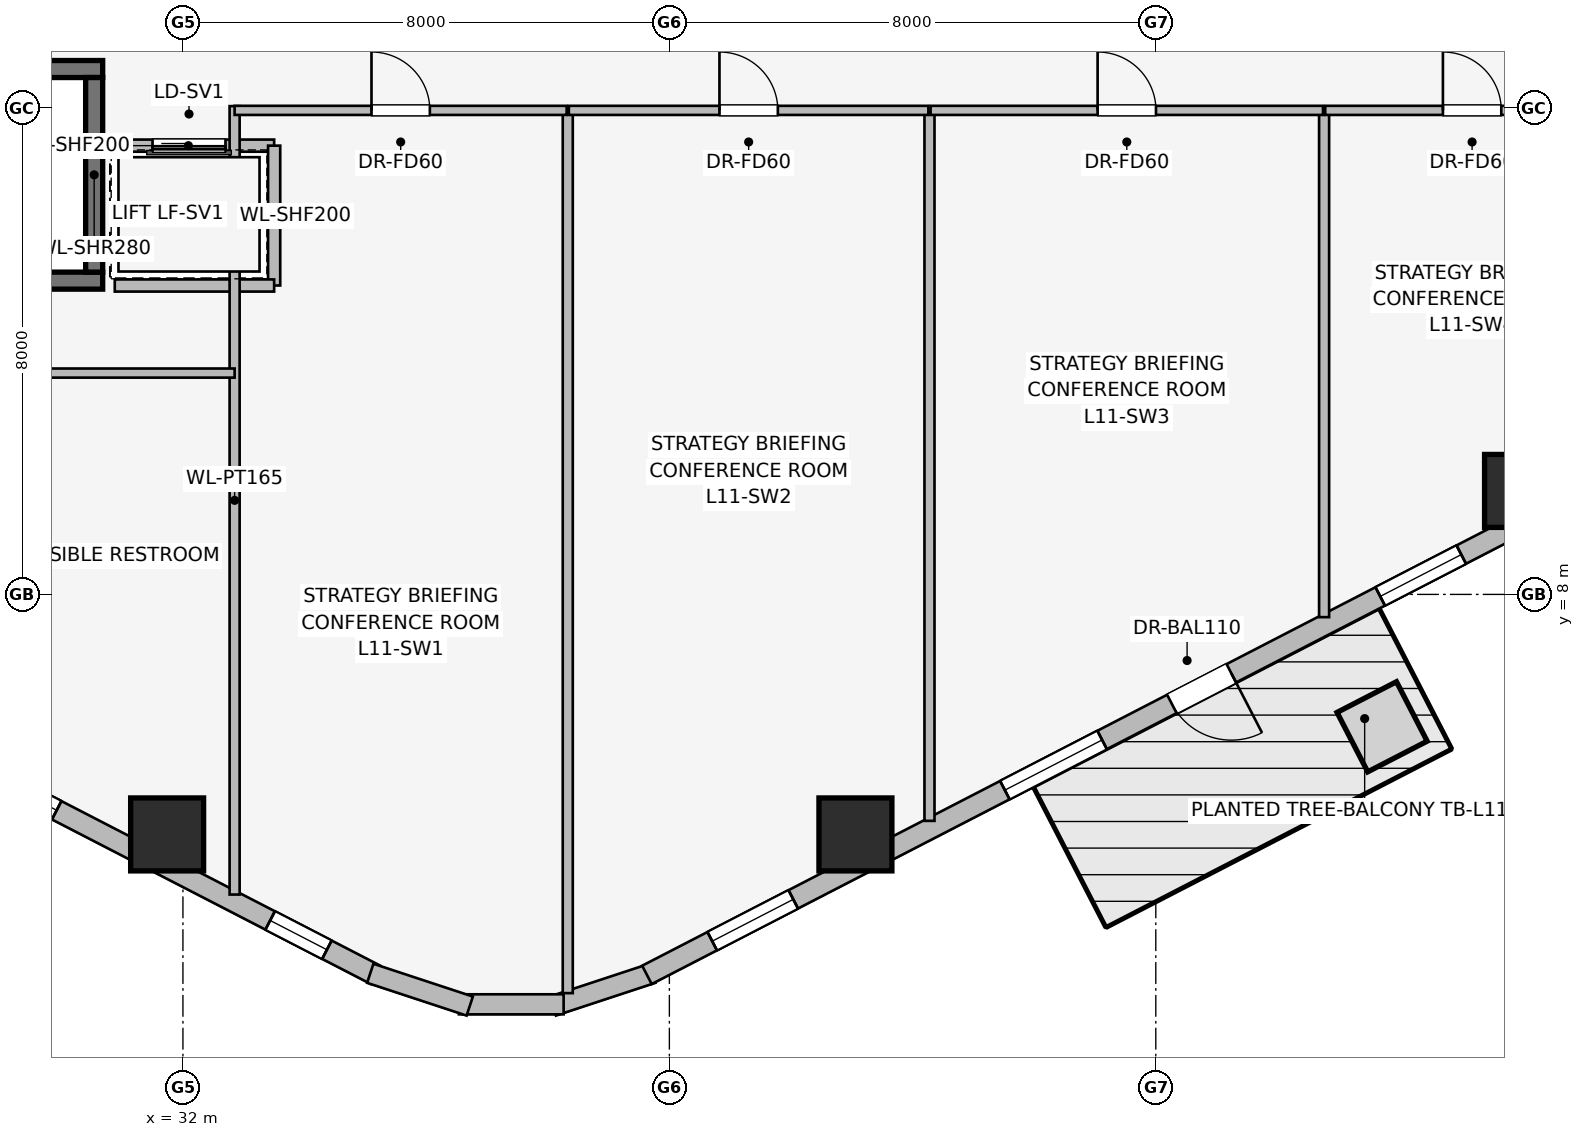
"""IFC4 building model, lengths in metres.
Left out: names, types, materials, properties, quantities, classifications, styles, units other than length and angle.
Written with IfcOpenShell. Run it as: python <this file> out.ifc"""

import sys

from ifc_helpers import new_model, si_unit, direction, frame, frame_2d, origin, origin_2d, place, context, subcontext, project, spatial, rectangle, extrude, element, fill, save


model = new_model("IFC4")
c1 = context("Model", 3, precision=1e-05, world=origin(), true_north=direction((0.0, 1.0)))
c2 = subcontext(c1, "Body", "Model", "MODEL_VIEW")
j1 = project(units=[si_unit("LENGTHUNIT", "METRE"), si_unit("PLANEANGLEUNIT", "RADIAN")], contexts=[c1])
p1 = place(None, origin())
s1 = spatial("IfcSite", under=j1, at=p1, CompositionType="ELEMENT")
p2 = place(p1, origin())
s2 = spatial("IfcBuilding", under=s1, at=p2, CompositionType="ELEMENT")
p3 = place(p2, frame((0.0, 0.0, 45.25)))
s3 = spatial("IfcBuildingStorey", under=s2, at=p3, CompositionType="ELEMENT", Elevation=45.25)
p4 = place(p3, frame((22.32, 13.16, 0.0), z_axis=(0.0, 0.0, 1.0), x_axis=(1.0, 0.0, 0.0)))
e1 = element("IfcWall", 1, at=p4, inside=s3, PredefinedType="SHEAR", context=c2, shape_type="SweptSolid", body=[
    extrude(rectangle(XDim=8.36, YDim=0.28, at=frame_2d((4.18, 0.0))), origin(), (0.0, 0.0, 1.0), 3.65),
])
p5 = place(p3, frame((30.68, 16.64, 0.0), z_axis=(0.0, 0.0, 1.0), x_axis=(-1.0, 0.0, 0.0)))
e2 = element("IfcWall", 2, at=p5, inside=s3, PredefinedType="SHEAR", context=c2, shape_type="SweptSolid", body=[
    extrude(rectangle(XDim=8.36, YDim=0.28, at=frame_2d((4.18, 0.0))), origin(), (0.0, 0.0, 1.0), 3.65),
])
p6 = place(p5, frame((6.08, 0.0, 0.0)))
e3 = element("IfcOpeningElement", 3, at=p6, cuts=e2, PredefinedType="OPENING", context=c2, shape_type="SweptSolid", body=[
    extrude(rectangle(XDim=1.05, YDim=2.0, at=frame_2d((0.525, 1.0))), frame((0.0, 0.15, 0.0), z_axis=(0.0, -1.0, 0.0), x_axis=(1.0, 0.0, 0.0)), (0.0, 0.0, 1.0), 0.3),
])
p7 = place(p3, frame((30.54, 13.3, 0.0), z_axis=(0.0, 0.0, 1.0), x_axis=(0.0, 1.0, 0.0)))
e4 = element("IfcWall", 4, at=p7, inside=s3, PredefinedType="SHEAR", context=c2, shape_type="SweptSolid", body=[
    extrude(rectangle(XDim=3.2, YDim=0.28, at=frame_2d((1.6, 0.0))), origin(), (0.0, 0.0, 1.0), 3.65),
])
for number, where, z_axis, x_axis in (
    (5, (31.74, 4.053, 0.0), (0.0, 0.0, 1.0), (1.0, 0.0, 0.0)),
    (6, (43.06, 4.053, 0.0), (0.0, 0.0, 1.0), (1.0, 0.0, 0.0)),
    (7, (54.007, 9.702, 0.0), (0.0, 0.0, 1.0), (1.0, 0.0, 0.0)),
):
    element("IfcColumn", number, at=place(p3, frame(where, z_axis=z_axis, x_axis=x_axis)), inside=s3, PredefinedType="COLUMN", context=c2, shape_type="SweptSolid", body=[
        extrude(rectangle(XDim=1.2, YDim=1.2, at=origin_2d()), origin(), (0.0, 0.0, 1.0), 3.65),
    ])
p8 = place(p3, frame((35.169, 1.743, 0.0), z_axis=(0.0, 0.0, 1.0), x_axis=(-0.888634413993, 0.458616264721, 0.0)))
e8 = element("IfcWall", 8, at=p8, inside=s3, PredefinedType="STANDARD", context=c2, shape_type="SweptSolid", body=[
    extrude(rectangle(XDim=20.531, YDim=0.34, at=frame_2d((10.266, 0.0))), origin(), (0.0, 0.0, 1.0), 2.684),
])
p9 = place(p8, frame((0.902, 0.0, 0.75)))
e9 = element("IfcOpeningElement", 9, at=p9, cuts=e8, PredefinedType="OPENING", context=c2, shape_type="SweptSolid", body=[
    extrude(rectangle(XDim=1.05, YDim=1.4, at=frame_2d((0.525, 0.7))), frame((0.0, 0.18, 0.0), z_axis=(0.0, -1.0, 0.0), x_axis=(1.0, 0.0, 0.0)), (0.0, 0.0, 1.0), 0.36),
])
p10 = place(p8, frame((5.903, 0.0, 0.75)))
e10 = element("IfcOpeningElement", 10, at=p10, cuts=e8, PredefinedType="OPENING", context=c2, shape_type="SweptSolid", body=[
    extrude(rectangle(XDim=1.5, YDim=1.5, at=frame_2d((0.75, 0.75))), frame((0.0, 0.18, 0.0), z_axis=(0.0, -1.0, 0.0), x_axis=(1.0, 0.0, 0.0)), (0.0, 0.0, 1.0), 0.36),
])
p11 = place(p8, frame((9.516, 0.0, 0.75)))
e11 = element("IfcOpeningElement", 11, at=p11, cuts=e8, PredefinedType="OPENING", context=c2, shape_type="SweptSolid", body=[
    extrude(rectangle(XDim=1.5, YDim=1.5, at=frame_2d((0.75, 0.75))), frame((0.0, 0.18, 0.0), z_axis=(0.0, -1.0, 0.0), x_axis=(1.0, 0.0, 0.0)), (0.0, 0.0, 1.0), 0.36),
])
p12 = place(p8, frame((13.129, 0.0, 0.75)))
e12 = element("IfcOpeningElement", 12, at=p12, cuts=e8, PredefinedType="OPENING", context=c2, shape_type="SweptSolid", body=[
    extrude(rectangle(XDim=1.5, YDim=1.5, at=frame_2d((0.75, 0.75))), frame((0.0, 0.18, 0.0), z_axis=(0.0, -1.0, 0.0), x_axis=(1.0, 0.0, 0.0)), (0.0, 0.0, 1.0), 0.36),
])
p13 = place(p8, frame((17.673, 0.0, 0.75)))
e13 = element("IfcOpeningElement", 13, at=p13, cuts=e8, PredefinedType="OPENING", context=c2, shape_type="SweptSolid", body=[
    extrude(rectangle(XDim=1.8, YDim=1.5, at=frame_2d((0.9, 0.75))), frame((0.0, 0.18, 0.0), z_axis=(0.0, -1.0, 0.0), x_axis=(1.0, 0.0, 0.0)), (0.0, 0.0, 1.0), 0.36),
])
p14 = place(p3, frame((39.719, 1.769, 0.0), z_axis=(0.0, 0.0, 1.0), x_axis=(-0.94976901097, -0.312951794691, 0.0)))
e14 = element("IfcWall", 14, at=p14, inside=s3, PredefinedType="STANDARD", context=c2, shape_type="SweptSolid", body=[
    extrude(rectangle(XDim=1.722, YDim=0.33, at=frame_2d((0.861, 0.0))), origin(), (0.0, 0.0, 1.0), 3.39),
])
p15 = place(p3, frame((38.261, 1.259, 0.0), z_axis=(0.0, 0.0, 1.0), x_axis=(-1.0, 0.0, 0.0)))
e15 = element("IfcWall", 15, at=p15, inside=s3, PredefinedType="STANDARD", context=c2, shape_type="SweptSolid", body=[
    extrude(rectangle(XDim=1.722, YDim=0.33, at=frame_2d((0.861, 0.0))), origin(), (0.0, 0.0, 1.0), 3.39),
])
p16 = place(p3, frame((36.717, 1.23, 0.0), z_axis=(0.0, 0.0, 1.0), x_axis=(-0.94976901097, 0.312951794691, 0.0)))
e16 = element("IfcWall", 16, at=p16, inside=s3, PredefinedType="STANDARD", context=c2, shape_type="SweptSolid", body=[
    extrude(rectangle(XDim=1.722, YDim=0.33, at=frame_2d((0.861, 0.0))), origin(), (0.0, 0.0, 1.0), 3.39),
])
p17 = place(p3, frame((57.876, 11.159, 0.0), z_axis=(0.0, 0.0, 1.0), x_axis=(-0.888634413993, -0.458616264721, 0.0)))
e17 = element("IfcWall", 17, at=p17, inside=s3, PredefinedType="STANDARD", context=c2, shape_type="SweptSolid", body=[
    extrude(rectangle(XDim=20.531, YDim=0.34, at=frame_2d((10.266, 0.0))), origin(), (0.0, 0.0, 1.0), 2.684),
])
p18 = place(p17, frame((9.716, 0.0, 0.0)))
e18 = element("IfcOpeningElement", 18, at=p18, cuts=e17, PredefinedType="OPENING", context=c2, shape_type="SweptSolid", body=[
    extrude(rectangle(XDim=1.1, YDim=2.04, at=frame_2d((0.55, 1.02))), frame((0.0, 0.18, 0.0), z_axis=(0.0, -1.0, 0.0), x_axis=(1.0, 0.0, 0.0)), (0.0, 0.0, 1.0), 0.36),
])
p19 = place(p17, frame((0.798, 0.0, 0.75)))
e19 = element("IfcOpeningElement", 19, at=p19, cuts=e17, PredefinedType="OPENING", context=c2, shape_type="SweptSolid", body=[
    extrude(rectangle(XDim=1.05, YDim=1.4, at=frame_2d((0.525, 0.7))), frame((0.0, 0.18, 0.0), z_axis=(0.0, -1.0, 0.0), x_axis=(1.0, 0.0, 0.0)), (0.0, 0.0, 1.0), 0.36),
])
p20 = place(p17, frame((5.46, 0.0, 0.75)))
e20 = element("IfcOpeningElement", 20, at=p20, cuts=e17, PredefinedType="OPENING", context=c2, shape_type="SweptSolid", body=[
    extrude(rectangle(XDim=1.5, YDim=1.5, at=frame_2d((0.75, 0.75))), frame((0.0, 0.18, 0.0), z_axis=(0.0, -1.0, 0.0), x_axis=(1.0, 0.0, 0.0)), (0.0, 0.0, 1.0), 0.36),
])
p21 = place(p17, frame((12.107, 0.0, 0.75)))
e21 = element("IfcOpeningElement", 21, at=p21, cuts=e17, PredefinedType="OPENING", context=c2, shape_type="SweptSolid", body=[
    extrude(rectangle(XDim=1.8, YDim=1.5, at=frame_2d((0.9, 0.75))), frame((0.0, 0.18, 0.0), z_axis=(0.0, -1.0, 0.0), x_axis=(1.0, 0.0, 0.0)), (0.0, 0.0, 1.0), 0.36),
])
p22 = place(p17, frame((17.823, 0.0, 0.75)))
e22 = element("IfcOpeningElement", 22, at=p22, cuts=e17, PredefinedType="OPENING", context=c2, shape_type="SweptSolid", body=[
    extrude(rectangle(XDim=1.5, YDim=1.5, at=frame_2d((0.75, 0.75))), frame((0.0, 0.18, 0.0), z_axis=(0.0, -1.0, 0.0), x_axis=(1.0, 0.0, 0.0)), (0.0, 0.0, 1.0), 0.36),
])
p23 = place(p3, frame((33.5, 15.38, 0.0), z_axis=(0.0, 0.0, 1.0), x_axis=(-1.0, 0.0, 0.0)))
e23 = element("IfcWall", 23, at=p23, inside=s3, PredefinedType="PARTITIONING", context=c2, shape_type="SweptSolid", body=[
    extrude(rectangle(XDim=2.82, YDim=0.2, at=frame_2d((1.41, 0.0))), origin(), (0.0, 0.0, 1.0), 3.39),
])
p24 = place(p23, frame((0.8, 0.0, 0.0)))
e24 = element("IfcOpeningElement", 24, at=p24, cuts=e23, PredefinedType="OPENING", context=c2, shape_type="SweptSolid", body=[
    extrude(rectangle(XDim=1.2, YDim=2.2, at=frame_2d((0.6, 1.1))), frame((0.0, 0.11, 0.0), z_axis=(0.0, -1.0, 0.0), x_axis=(1.0, 0.0, 0.0)), (0.0, 0.0, 1.0), 0.22),
])
p25 = place(p3, frame((33.5, 13.08, 0.0), z_axis=(0.0, 0.0, 1.0), x_axis=(0.0, 1.0, 0.0)))
e25 = element("IfcWall", 25, at=p25, inside=s3, PredefinedType="PARTITIONING", context=c2, shape_type="SweptSolid", body=[
    extrude(rectangle(XDim=2.3, YDim=0.2, at=frame_2d((1.15, 0.0))), origin(), (0.0, 0.0, 1.0), 3.39),
])
p26 = place(p3, frame((30.879, 13.08, 0.0), z_axis=(0.0, 0.0, 1.0), x_axis=(1.0, 0.0, 0.0)))
e26 = element("IfcWall", 26, at=p26, inside=s3, PredefinedType="PARTITIONING", context=c2, shape_type="SweptSolid", body=[
    extrude(rectangle(XDim=2.621, YDim=0.2, at=frame_2d((1.311, 0.0))), origin(), (0.0, 0.0, 1.0), 3.39),
])
p27 = place(p3, frame((32.85, 3.064, 0.0), z_axis=(0.0, 0.0, 1.0), x_axis=(0.0, 1.0, 0.0)))
e27 = element("IfcWall", 27, at=p27, inside=s3, PredefinedType="PARTITIONING", context=c2, shape_type="SweptSolid", body=[
    extrude(rectangle(XDim=12.966, YDim=0.165, at=frame_2d((6.483, 0.0))), origin(), (0.0, 0.0, 1.0), 3.39),
])
p28 = place(p3, frame((16.487, 11.64, 0.0), z_axis=(0.0, 0.0, 1.0), x_axis=(1.0, 0.0, 0.0)))
e28 = element("IfcWall", 28, at=p28, inside=s3, PredefinedType="PARTITIONING", context=c2, shape_type="SweptSolid", body=[
    extrude(rectangle(XDim=16.363, YDim=0.15, at=frame_2d((8.182, 0.0))), origin(), (0.0, 0.0, 1.0), 3.39),
])
p29 = place(p28, frame((6.513, 0.0, 0.0)))
e29 = element("IfcOpeningElement", 29, at=p29, cuts=e28, PredefinedType="OPENING", context=c2, shape_type="SweptSolid", body=[
    extrude(rectangle(XDim=0.9, YDim=2.0, at=frame_2d((0.45, 1.0))), frame((0.0, 0.085, 0.0), z_axis=(0.0, -1.0, 0.0), x_axis=(1.0, 0.0, 0.0)), (0.0, 0.0, 1.0), 0.17),
])
p30 = place(p3, frame((38.329, 1.443, 0.0), z_axis=(0.0, 0.0, 1.0), x_axis=(0.0, 1.0, 0.0)))
e30 = element("IfcWall", 30, at=p30, inside=s3, PredefinedType="PARTITIONING", context=c2, shape_type="SweptSolid", body=[
    extrude(rectangle(XDim=14.487, YDim=0.165, at=frame_2d((7.243, 0.0))), origin(), (0.0, 0.0, 1.0), 3.39),
])
p31 = place(p3, frame((44.278, 4.276, 0.0), z_axis=(0.0, 0.0, 1.0), x_axis=(0.0, 1.0, 0.0)))
e31 = element("IfcWall", 31, at=p31, inside=s3, PredefinedType="PARTITIONING", context=c2, shape_type="SweptSolid", body=[
    extrude(rectangle(XDim=11.654, YDim=0.165, at=frame_2d((5.827, 0.0))), origin(), (0.0, 0.0, 1.0), 3.39),
])
p32 = place(p3, frame((50.768, 7.626, 0.0), z_axis=(0.0, 0.0, 1.0), x_axis=(0.0, 1.0, 0.0)))
e32 = element("IfcWall", 32, at=p32, inside=s3, PredefinedType="PARTITIONING", context=c2, shape_type="SweptSolid", body=[
    extrude(rectangle(XDim=8.304, YDim=0.165, at=frame_2d((4.152, 0.0))), origin(), (0.0, 0.0, 1.0), 3.39),
])
p33 = place(p3, frame((32.85, 15.96, 0.0), z_axis=(0.0, 0.0, 1.0), x_axis=(1.0, 0.0, 0.0)))
e33 = element("IfcWall", 33, at=p33, inside=s3, PredefinedType="PARTITIONING", context=c2, shape_type="SweptSolid", body=[
    extrude(rectangle(XDim=5.461, YDim=0.15, at=frame_2d((2.73, 0.0))), origin(), (0.0, 0.0, 1.0), 3.39),
])
p34 = place(p33, frame((2.251, 0.0, 0.0)))
e34 = element("IfcOpeningElement", 34, at=p34, cuts=e33, PredefinedType="OPENING", context=c2, shape_type="SweptSolid", body=[
    extrude(rectangle(XDim=0.96, YDim=2.0, at=frame_2d((0.48, 1.0))), frame((0.0, 0.085, 0.0), z_axis=(0.0, -1.0, 0.0), x_axis=(1.0, 0.0, 0.0)), (0.0, 0.0, 1.0), 0.17),
])
p35 = place(p3, frame((38.347, 15.96, 0.0), z_axis=(0.0, 0.0, 1.0), x_axis=(1.0, 0.0, 0.0)))
e35 = element("IfcWall", 35, at=p35, inside=s3, PredefinedType="PARTITIONING", context=c2, shape_type="SweptSolid", body=[
    extrude(rectangle(XDim=5.913, YDim=0.15, at=frame_2d((2.957, 0.0))), origin(), (0.0, 0.0, 1.0), 3.39),
])
p36 = place(p35, frame((2.477, 0.0, 0.0)))
e36 = element("IfcOpeningElement", 36, at=p36, cuts=e35, PredefinedType="OPENING", context=c2, shape_type="SweptSolid", body=[
    extrude(rectangle(XDim=0.96, YDim=2.0, at=frame_2d((0.48, 1.0))), frame((0.0, 0.085, 0.0), z_axis=(0.0, -1.0, 0.0), x_axis=(1.0, 0.0, 0.0)), (0.0, 0.0, 1.0), 0.17),
])
p37 = place(p3, frame((44.296, 15.96, 0.0), z_axis=(0.0, 0.0, 1.0), x_axis=(1.0, 0.0, 0.0)))
e37 = element("IfcWall", 37, at=p37, inside=s3, PredefinedType="PARTITIONING", context=c2, shape_type="SweptSolid", body=[
    extrude(rectangle(XDim=6.454, YDim=0.15, at=frame_2d((3.227, 0.0))), origin(), (0.0, 0.0, 1.0), 3.39),
])
p38 = place(p37, frame((2.747, 0.0, 0.0)))
e38 = element("IfcOpeningElement", 38, at=p38, cuts=e37, PredefinedType="OPENING", context=c2, shape_type="SweptSolid", body=[
    extrude(rectangle(XDim=0.96, YDim=2.0, at=frame_2d((0.48, 1.0))), frame((0.0, 0.085, 0.0), z_axis=(0.0, -1.0, 0.0), x_axis=(1.0, 0.0, 0.0)), (0.0, 0.0, 1.0), 0.17),
])
p39 = place(p3, frame((50.786, 15.96, 0.0), z_axis=(0.0, 0.0, 1.0), x_axis=(1.0, 0.0, 0.0)))
e39 = element("IfcWall", 39, at=p39, inside=s3, PredefinedType="PARTITIONING", context=c2, shape_type="SweptSolid", body=[
    extrude(rectangle(XDim=4.832, YDim=0.15, at=frame_2d((2.416, 0.0))), origin(), (0.0, 0.0, 1.0), 3.39),
])
p40 = place(p39, frame((1.936, 0.0, 0.0)))
e40 = element("IfcOpeningElement", 40, at=p40, cuts=e39, PredefinedType="OPENING", context=c2, shape_type="SweptSolid", body=[
    extrude(rectangle(XDim=0.96, YDim=2.0, at=frame_2d((0.48, 1.0))), frame((0.0, 0.085, 0.0), z_axis=(0.0, -1.0, 0.0), x_axis=(1.0, 0.0, 0.0)), (0.0, 0.0, 1.0), 0.17),
])
p41 = place(p9, origin())
e41 = element("IfcWindow", 41, at=p41, inside=s3, PartitioningType="SINGLE_PANEL", PredefinedType="WINDOW", context=c2, shape_type="SweptSolid", body=[
    extrude(rectangle(XDim=1.05, YDim=1.4, at=frame_2d((0.525, 0.7))), frame((0.0, 0.03, 0.0), z_axis=(0.0, -1.0, 0.0), x_axis=(1.0, 0.0, 0.0)), (0.0, 0.0, 1.0), 0.06),
])
fill(e9, e41)
p42 = place(p10, origin())
e42 = element("IfcWindow", 42, at=p42, inside=s3, PartitioningType="SINGLE_PANEL", PredefinedType="WINDOW", context=c2, shape_type="SweptSolid", body=[
    extrude(rectangle(XDim=1.5, YDim=1.5, at=frame_2d((0.75, 0.75))), frame((0.0, 0.03, 0.0), z_axis=(0.0, -1.0, 0.0), x_axis=(1.0, 0.0, 0.0)), (0.0, 0.0, 1.0), 0.06),
])
fill(e10, e42)
p43 = place(p18, origin())
e43 = element("IfcDoor", 43, at=p43, inside=s3, OperationType="SINGLE_SWING_LEFT", PredefinedType="DOOR", context=c2, shape_type="SweptSolid", body=[
    extrude(rectangle(XDim=1.1, YDim=2.04, at=frame_2d((0.55, 1.02))), frame((0.0, 0.025, 0.0), z_axis=(0.0, -1.0, 0.0), x_axis=(1.0, 0.0, 0.0)), (0.0, 0.0, 1.0), 0.05),
])
fill(e18, e43)
p44 = place(p20, origin())
e44 = element("IfcWindow", 44, at=p44, inside=s3, PartitioningType="SINGLE_PANEL", PredefinedType="WINDOW", context=c2, shape_type="SweptSolid", body=[
    extrude(rectangle(XDim=1.5, YDim=1.5, at=frame_2d((0.75, 0.75))), frame((0.0, 0.03, 0.0), z_axis=(0.0, -1.0, 0.0), x_axis=(1.0, 0.0, 0.0)), (0.0, 0.0, 1.0), 0.06),
])
fill(e20, e44)
p45 = place(p21, origin())
e45 = element("IfcWindow", 45, at=p45, inside=s3, PartitioningType="SINGLE_PANEL", PredefinedType="WINDOW", context=c2, shape_type="SweptSolid", body=[
    extrude(rectangle(XDim=1.8, YDim=1.5, at=frame_2d((0.9, 0.75))), frame((0.0, 0.03, 0.0), z_axis=(0.0, -1.0, 0.0), x_axis=(1.0, 0.0, 0.0)), (0.0, 0.0, 1.0), 0.06),
])
fill(e21, e45)
p46 = place(p22, origin())
e46 = element("IfcWindow", 46, at=p46, inside=s3, PartitioningType="SINGLE_PANEL", PredefinedType="WINDOW", context=c2, shape_type="SweptSolid", body=[
    extrude(rectangle(XDim=1.5, YDim=1.5, at=frame_2d((0.75, 0.75))), frame((0.0, 0.03, 0.0), z_axis=(0.0, -1.0, 0.0), x_axis=(1.0, 0.0, 0.0)), (0.0, 0.0, 1.0), 0.06),
])
fill(e22, e46)
p47 = place(p24, origin())
e47 = element("IfcDoor", 47, at=p47, inside=s3, OperationType="SLIDING_TO_RIGHT", PredefinedType="DOOR", context=c2, shape_type="SweptSolid", body=[
    extrude(rectangle(XDim=1.2, YDim=2.2, at=frame_2d((0.6, 1.1))), frame((0.0, 0.025, 0.0), z_axis=(0.0, -1.0, 0.0), x_axis=(1.0, 0.0, 0.0)), (0.0, 0.0, 1.0), 0.05),
])
fill(e24, e47)
p48 = place(p34, origin())
e48 = element("IfcDoor", 48, at=p48, inside=s3, OperationType="SINGLE_SWING_LEFT", PredefinedType="DOOR", context=c2, shape_type="SweptSolid", body=[
    extrude(rectangle(XDim=0.96, YDim=2.0, at=frame_2d((0.48, 1.0))), frame((0.0, 0.025, 0.0), z_axis=(0.0, -1.0, 0.0), x_axis=(1.0, 0.0, 0.0)), (0.0, 0.0, 1.0), 0.05),
])
fill(e34, e48)
p49 = place(p36, origin())
e49 = element("IfcDoor", 49, at=p49, inside=s3, OperationType="SINGLE_SWING_LEFT", PredefinedType="DOOR", context=c2, shape_type="SweptSolid", body=[
    extrude(rectangle(XDim=0.96, YDim=2.0, at=frame_2d((0.48, 1.0))), frame((0.0, 0.025, 0.0), z_axis=(0.0, -1.0, 0.0), x_axis=(1.0, 0.0, 0.0)), (0.0, 0.0, 1.0), 0.05),
])
fill(e36, e49)
p50 = place(p38, origin())
e50 = element("IfcDoor", 50, at=p50, inside=s3, OperationType="SINGLE_SWING_LEFT", PredefinedType="DOOR", context=c2, shape_type="SweptSolid", body=[
    extrude(rectangle(XDim=0.96, YDim=2.0, at=frame_2d((0.48, 1.0))), frame((0.0, 0.025, 0.0), z_axis=(0.0, -1.0, 0.0), x_axis=(1.0, 0.0, 0.0)), (0.0, 0.0, 1.0), 0.05),
])
fill(e38, e50)
p51 = place(p40, origin())
e51 = element("IfcDoor", 51, at=p51, inside=s3, OperationType="SINGLE_SWING_LEFT", PredefinedType="DOOR", context=c2, shape_type="SweptSolid", body=[
    extrude(rectangle(XDim=0.96, YDim=2.0, at=frame_2d((0.48, 1.0))), frame((0.0, 0.025, 0.0), z_axis=(0.0, -1.0, 0.0), x_axis=(1.0, 0.0, 0.0)), (0.0, 0.0, 1.0), 0.05),
])
fill(e40, e51)
save(model, sys.argv[1])
